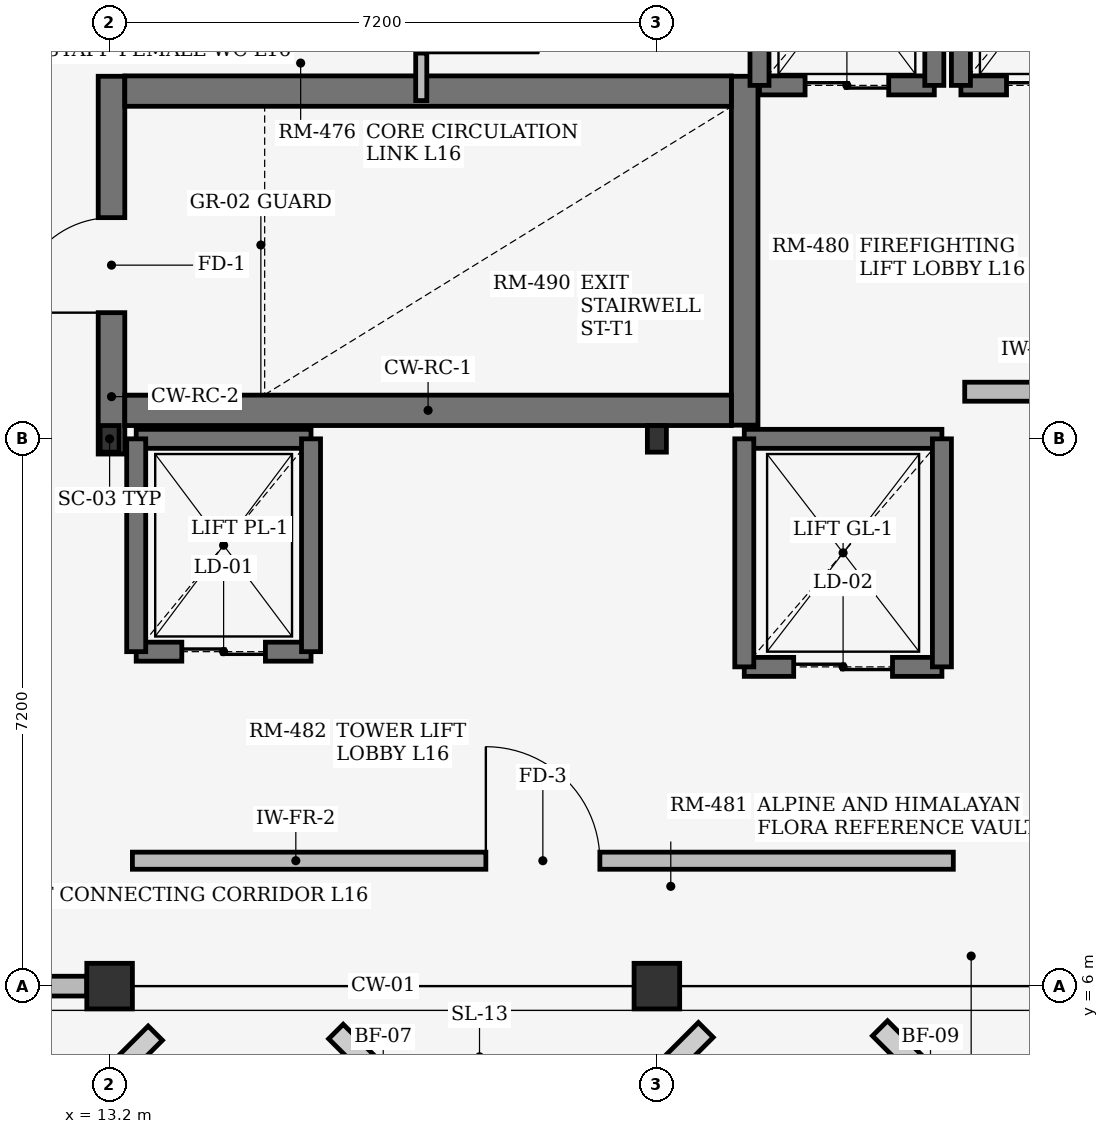
"""IFC4 building model, lengths in metres.
Left out: names, types, materials, properties, quantities, classifications, styles, units other than length and angle.
Written with IfcOpenShell. Run it as: python <this file> out.ifc"""

import sys

from ifc_helpers import new_model, si_unit, direction, frame, frame_2d, origin, origin_2d, place, context, subcontext, project, spatial, rectangle, i_section, extrude, element, fill, save


model = new_model("IFC4")
c1 = context("Model", 3, precision=1e-05, world=origin(), true_north=direction((0.0, 1.0)))
c2 = subcontext(c1, "Body", "Model", "MODEL_VIEW")
j1 = project(units=[si_unit("LENGTHUNIT", "METRE"), si_unit("PLANEANGLEUNIT", "RADIAN")], contexts=[c1])
p1 = place(None, origin())
s1 = spatial("IfcSite", under=j1, at=p1, CompositionType="ELEMENT")
p2 = place(p1, origin())
s2 = spatial("IfcBuilding", under=s1, at=p2, CompositionType="ELEMENT")
p3 = place(p2, frame((0.0, 0.0, 63.15)))
s3 = spatial("IfcBuildingStorey", under=s2, at=p3, CompositionType="ELEMENT", Elevation=63.15)
p4 = place(p3, frame((13.2, 6.0, 0.0), z_axis=(0.0, 0.0, 1.0), x_axis=(1.0, 0.0, 0.0)))
e1 = element("IfcColumn", 1, at=p4, inside=s3, PredefinedType="COLUMN", context=c2, shape_type="SweptSolid", body=[
    extrude(rectangle(XDim=0.6, YDim=0.6, at=origin_2d()), origin(), (0.0, 0.0, 1.0), 3.49),
])
p5 = place(p3, frame((13.2, 13.2, 0.0), z_axis=(0.0, 0.0, 1.0), x_axis=(1.0, 0.0, 0.0)))
e2 = element("IfcColumn", 2, at=p5, inside=s3, PredefinedType="COLUMN", context=c2, shape_type="SweptSolid", body=[
    extrude(i_section(OverallWidth=0.25, OverallDepth=0.35, WebThickness=0.01, FlangeThickness=0.012, at=origin_2d()), origin(), (0.0, 0.0, 1.0), 3.49),
])
p6 = place(p3, frame((20.4, 6.0, 0.0), z_axis=(0.0, 0.0, 1.0), x_axis=(1.0, 0.0, 0.0)))
e3 = element("IfcColumn", 3, at=p6, inside=s3, PredefinedType="COLUMN", context=c2, shape_type="SweptSolid", body=[
    extrude(rectangle(XDim=0.6, YDim=0.6, at=origin_2d()), origin(), (0.0, 0.0, 1.0), 3.49),
])
p7 = place(p3, frame((20.4, 13.2, 0.0), z_axis=(0.0, 0.0, 1.0), x_axis=(1.0, 0.0, 0.0)))
e4 = element("IfcColumn", 4, at=p7, inside=s3, PredefinedType="COLUMN", context=c2, shape_type="SweptSolid", body=[
    extrude(i_section(OverallWidth=0.25, OverallDepth=0.35, WebThickness=0.01, FlangeThickness=0.012, at=origin_2d()), origin(), (0.0, 0.0, 1.0), 3.49),
])
p8 = place(p3, frame((6.3, 6.0, 0.0), z_axis=(0.0, 0.0, 1.0), x_axis=(1.0, 0.0, 0.0)))
e5 = element("IfcWall", 5, at=p8, inside=s3, PredefinedType="STANDARD", context=c2, shape_type="SweptSolid", body=[
    extrude(rectangle(XDim=6.6, YDim=0.26, at=frame_2d((3.3, 0.0))), origin(), (0.0, 0.0, 1.0), 3.07),
])
p9 = place(p8, frame((2.6, 0.0, 0.75)))
e6 = element("IfcOpeningElement", 6, at=p9, cuts=e5, PredefinedType="OPENING", context=c2, shape_type="SweptSolid", body=[
    extrude(rectangle(XDim=1.4, YDim=1.25, at=frame_2d((0.7, 0.625))), frame((0.0, 0.14, 0.0), z_axis=(0.0, -1.0, 0.0), x_axis=(1.0, 0.0, 0.0)), (0.0, 0.0, 1.0), 0.28),
])
p10 = place(p3, frame((13.225, 13.0, 0.0), z_axis=(0.0, 0.0, 1.0), x_axis=(0.0, 1.0, 0.0)))
e7 = element("IfcWall", 7, at=p10, inside=s3, PredefinedType="SHEAR", context=c2, shape_type="SweptSolid", body=[
    extrude(rectangle(XDim=4.97, YDim=0.35, at=frame_2d((2.485, 0.0))), origin(), (0.0, 0.0, 1.0), 3.49),
])
p11 = place(p10, frame((1.86, 0.0, 0.0)))
e8 = element("IfcOpeningElement", 8, at=p11, cuts=e7, PredefinedType="OPENING", context=c2, shape_type="SweptSolid", body=[
    extrude(rectangle(XDim=1.25, YDim=2.2, at=frame_2d((0.625, 1.1))), frame((0.0, 0.185, 0.0), z_axis=(0.0, -1.0, 0.0), x_axis=(1.0, 0.0, 0.0)), (0.0, 0.0, 1.0), 0.37),
])
p12 = place(p3, frame((21.555, 13.38, 0.0), z_axis=(0.0, 0.0, 1.0), x_axis=(0.0, 1.0, 0.0)))
e9 = element("IfcWall", 9, at=p12, inside=s3, PredefinedType="SHEAR", context=c2, shape_type="SweptSolid", body=[
    extrude(rectangle(XDim=4.59, YDim=0.35, at=frame_2d((2.295, 0.0))), origin(), (0.0, 0.0, 1.0), 3.49),
])
for number, where, z_axis, x_axis in (
    (10, (13.4, 13.575, 0.0), (0.0, 0.0, 1.0), (1.0, 0.0, 0.0)),
    (11, (13.4, 17.775, 0.0), (0.0, 0.0, 1.0), (1.0, 0.0, 0.0)),
):
    element("IfcWall", number, at=place(p3, frame(where, z_axis=z_axis, x_axis=x_axis)), inside=s3, PredefinedType="SHEAR", context=c2, shape_type="SweptSolid", body=[
        extrude(rectangle(XDim=7.98, YDim=0.4, at=frame_2d((3.99, 0.0))), origin(), (0.0, 0.0, 1.0), 3.49),
    ])
p13 = place(p3, frame((21.75, 17.85, 0.0), z_axis=(0.0, 0.0, 1.0), x_axis=(1.0, 0.0, 0.0)))
e12 = element("IfcWall", 12, at=p13, inside=s3, PredefinedType="SHEAR", context=c2, shape_type="SweptSolid", body=[
    extrude(rectangle(XDim=2.3, YDim=0.25, at=frame_2d((1.15, 0.0))), origin(), (0.0, 0.0, 1.0), 3.49),
])
p14 = place(p13, frame((0.6, 0.0, 0.0)))
e13 = element("IfcOpeningElement", 13, at=p14, cuts=e12, PredefinedType="OPENING", context=c2, shape_type="SweptSolid", body=[
    extrude(rectangle(XDim=1.1, YDim=2.2, at=frame_2d((0.55, 1.1))), frame((0.0, 0.135, 0.0), z_axis=(0.0, -1.0, 0.0), x_axis=(1.0, 0.0, 0.0)), (0.0, 0.0, 1.0), 0.27),
])
for number, where, z_axis, x_axis in (
    (14, (21.75, 17.85, 0.0), (0.0, 0.0, 1.0), (0.0, 1.0, 0.0)),
    (15, (24.05, 17.85, 0.0), (0.0, 0.0, 1.0), (0.0, 1.0, 0.0)),
):
    element("IfcWall", number, at=place(p3, frame(where, z_axis=z_axis, x_axis=x_axis)), inside=s3, PredefinedType="SHEAR", context=c2, shape_type="SweptSolid", body=[
        extrude(rectangle(XDim=2.7, YDim=0.25, at=frame_2d((1.35, 0.0))), origin(), (0.0, 0.0, 1.0), 3.49),
    ])
p15 = place(p3, frame((24.4, 17.85, 0.0), z_axis=(0.0, 0.0, 1.0), x_axis=(1.0, 0.0, 0.0)))
e16 = element("IfcWall", 16, at=p15, inside=s3, PredefinedType="SHEAR", context=c2, shape_type="SweptSolid", body=[
    extrude(rectangle(XDim=2.3, YDim=0.25, at=frame_2d((1.15, 0.0))), origin(), (0.0, 0.0, 1.0), 3.49),
])
p16 = place(p15, frame((0.6, 0.0, 0.0)))
e17 = element("IfcOpeningElement", 17, at=p16, cuts=e16, PredefinedType="OPENING", context=c2, shape_type="SweptSolid", body=[
    extrude(rectangle(XDim=1.1, YDim=2.2, at=frame_2d((0.55, 1.1))), frame((0.0, 0.135, 0.0), z_axis=(0.0, -1.0, 0.0), x_axis=(1.0, 0.0, 0.0)), (0.0, 0.0, 1.0), 0.27),
])
p17 = place(p3, frame((24.4, 17.85, 0.0), z_axis=(0.0, 0.0, 1.0), x_axis=(0.0, 1.0, 0.0)))
e18 = element("IfcWall", 18, at=p17, inside=s3, PredefinedType="SHEAR", context=c2, shape_type="SweptSolid", body=[
    extrude(rectangle(XDim=2.7, YDim=0.25, at=frame_2d((1.35, 0.0))), origin(), (0.0, 0.0, 1.0), 3.49),
])
p18 = place(p3, frame((13.55, 10.4, 0.0), z_axis=(0.0, 0.0, 1.0), x_axis=(1.0, 0.0, 0.0)))
e19 = element("IfcWall", 19, at=p18, inside=s3, PredefinedType="SHEAR", context=c2, shape_type="SweptSolid", body=[
    extrude(rectangle(XDim=2.3, YDim=0.25, at=frame_2d((1.15, 0.0))), origin(), (0.0, 0.0, 1.0), 3.49),
])
p19 = place(p18, frame((0.6, 0.0, 0.0)))
e20 = element("IfcOpeningElement", 20, at=p19, cuts=e19, PredefinedType="OPENING", context=c2, shape_type="SweptSolid", body=[
    extrude(rectangle(XDim=1.1, YDim=2.2, at=frame_2d((0.55, 1.1))), frame((0.0, 0.135, 0.0), z_axis=(0.0, -1.0, 0.0), x_axis=(1.0, 0.0, 0.0)), (0.0, 0.0, 1.0), 0.27),
])
p20 = place(p3, frame((13.55, 13.2, 0.0), z_axis=(0.0, 0.0, 1.0), x_axis=(1.0, 0.0, 0.0)))
e21 = element("IfcWall", 21, at=p20, inside=s3, PredefinedType="SHEAR", context=c2, shape_type="SweptSolid", body=[
    extrude(rectangle(XDim=2.3, YDim=0.25, at=frame_2d((1.15, 0.0))), origin(), (0.0, 0.0, 1.0), 3.49),
])
for number, where, z_axis, x_axis in (
    (22, (13.55, 10.4, 0.0), (0.0, 0.0, 1.0), (0.0, 1.0, 0.0)),
    (23, (15.85, 10.4, 0.0), (0.0, 0.0, 1.0), (0.0, 1.0, 0.0)),
):
    element("IfcWall", number, at=place(p3, frame(where, z_axis=z_axis, x_axis=x_axis)), inside=s3, PredefinedType="SHEAR", context=c2, shape_type="SweptSolid", body=[
        extrude(rectangle(XDim=2.8, YDim=0.25, at=frame_2d((1.4, 0.0))), origin(), (0.0, 0.0, 1.0), 3.49),
    ])
p21 = place(p3, frame((21.55, 10.2, 0.0), z_axis=(0.0, 0.0, 1.0), x_axis=(1.0, 0.0, 0.0)))
e24 = element("IfcWall", 24, at=p21, inside=s3, PredefinedType="SHEAR", context=c2, shape_type="SweptSolid", body=[
    extrude(rectangle(XDim=2.6, YDim=0.25, at=frame_2d((1.3, 0.0))), origin(), (0.0, 0.0, 1.0), 3.49),
])
p22 = place(p21, frame((0.65, 0.0, 0.0)))
e25 = element("IfcOpeningElement", 25, at=p22, cuts=e24, PredefinedType="OPENING", context=c2, shape_type="SweptSolid", body=[
    extrude(rectangle(XDim=1.3, YDim=2.25, at=frame_2d((0.65, 1.125))), frame((0.0, 0.135, 0.0), z_axis=(0.0, -1.0, 0.0), x_axis=(1.0, 0.0, 0.0)), (0.0, 0.0, 1.0), 0.27),
])
p23 = place(p3, frame((21.55, 13.2, 0.0), z_axis=(0.0, 0.0, 1.0), x_axis=(1.0, 0.0, 0.0)))
e26 = element("IfcWall", 26, at=p23, inside=s3, PredefinedType="SHEAR", context=c2, shape_type="SweptSolid", body=[
    extrude(rectangle(XDim=2.6, YDim=0.25, at=frame_2d((1.3, 0.0))), origin(), (0.0, 0.0, 1.0), 3.49),
])
for number, where, z_axis, x_axis in (
    (27, (21.55, 10.2, 0.0), (0.0, 0.0, 1.0), (0.0, 1.0, 0.0)),
    (28, (24.15, 10.2, 0.0), (0.0, 0.0, 1.0), (0.0, 1.0, 0.0)),
):
    element("IfcWall", number, at=place(p3, frame(where, z_axis=z_axis, x_axis=x_axis)), inside=s3, PredefinedType="SHEAR", context=c2, shape_type="SweptSolid", body=[
        extrude(rectangle(XDim=3.0, YDim=0.25, at=frame_2d((1.5, 0.0))), origin(), (0.0, 0.0, 1.0), 3.49),
    ])
p24 = place(p3, frame((24.45, 13.82, 0.0), z_axis=(0.0, 0.0, 1.0), x_axis=(1.0, 0.0, 0.0)))
e29 = element("IfcWall", 29, at=p24, inside=s3, PredefinedType="SOLIDWALL", context=c2, shape_type="SweptSolid", body=[
    extrude(rectangle(XDim=2.0, YDim=0.25, at=frame_2d((1.0, 0.0))), origin(), (0.0, 0.0, 1.0), 3.47),
])
p25 = place(p3, frame((13.5, 7.65, 0.0), z_axis=(0.0, 0.0, 1.0), x_axis=(1.0, 0.0, 0.0)))
e30 = element("IfcWall", 30, at=p25, inside=s3, PredefinedType="SOLIDWALL", context=c2, shape_type="SweptSolid", body=[
    extrude(rectangle(XDim=10.8, YDim=0.225, at=frame_2d((5.4, 0.0))), origin(), (0.0, 0.0, 1.0), 3.47),
])
p26 = place(p25, frame((4.65, 0.0, 0.0)))
e31 = element("IfcOpeningElement", 31, at=p26, cuts=e30, PredefinedType="OPENING", context=c2, shape_type="SweptSolid", body=[
    extrude(rectangle(XDim=1.5, YDim=2.2, at=frame_2d((0.75, 1.1))), frame((0.0, 0.123, 0.0), z_axis=(0.0, -1.0, 0.0), x_axis=(1.0, 0.0, 0.0)), (0.0, 0.0, 1.0), 0.245),
])
p27 = place(p3, frame((17.3, 17.65, 0.0), z_axis=(0.0, 0.0, 1.0), x_axis=(0.0, 1.0, 0.0)))
e32 = element("IfcWall", 32, at=p27, inside=s3, PredefinedType="PARTITIONING", context=c2, shape_type="SweptSolid", body=[
    extrude(rectangle(XDim=2.8, YDim=0.146, at=frame_2d((1.4, 0.0))), origin(), (0.0, 0.0, 1.0), 3.47),
])
p28 = place(p27, frame((0.625, 0.0, 0.0)))
e33 = element("IfcOpeningElement", 33, at=p28, cuts=e32, PredefinedType="OPENING", context=c2, shape_type="SweptSolid", body=[
    extrude(rectangle(XDim=1.55, YDim=2.25, at=frame_2d((0.775, 1.125))), frame((0.0, 0.083, 0.0), z_axis=(0.0, -1.0, 0.0), x_axis=(1.0, 0.0, 0.0)), (0.0, 0.0, 1.0), 0.166),
])
p29 = place(p11, origin())
e34 = element("IfcDoor", 34, at=p29, inside=s3, OperationType="SINGLE_SWING_LEFT", PredefinedType="DOOR", context=c2, shape_type="SweptSolid", body=[
    extrude(rectangle(XDim=1.25, YDim=2.2, at=frame_2d((0.625, 1.1))), frame((0.0, 0.025, 0.0), z_axis=(0.0, -1.0, 0.0), x_axis=(1.0, 0.0, 0.0)), (0.0, 0.0, 1.0), 0.05),
])
fill(e8, e34)
p30 = place(p14, origin())
e35 = element("IfcDoor", 35, at=p30, inside=s3, OperationType="DOUBLE_DOOR_SLIDING", PredefinedType="DOOR", context=c2, shape_type="SweptSolid", body=[
    extrude(rectangle(XDim=1.1, YDim=2.2, at=frame_2d((0.55, 1.1))), frame((0.0, 0.025, 0.0), z_axis=(0.0, -1.0, 0.0), x_axis=(1.0, 0.0, 0.0)), (0.0, 0.0, 1.0), 0.05),
])
fill(e13, e35)
p31 = place(p16, origin())
e36 = element("IfcDoor", 36, at=p31, inside=s3, OperationType="DOUBLE_DOOR_SLIDING", PredefinedType="DOOR", context=c2, shape_type="SweptSolid", body=[
    extrude(rectangle(XDim=1.1, YDim=2.2, at=frame_2d((0.55, 1.1))), frame((0.0, 0.025, 0.0), z_axis=(0.0, -1.0, 0.0), x_axis=(1.0, 0.0, 0.0)), (0.0, 0.0, 1.0), 0.05),
])
fill(e17, e36)
p32 = place(p19, origin())
e37 = element("IfcDoor", 37, at=p32, inside=s3, OperationType="DOUBLE_DOOR_SLIDING", PredefinedType="DOOR", context=c2, shape_type="SweptSolid", body=[
    extrude(rectangle(XDim=1.1, YDim=2.2, at=frame_2d((0.55, 1.1))), frame((0.0, 0.025, 0.0), z_axis=(0.0, -1.0, 0.0), x_axis=(1.0, 0.0, 0.0)), (0.0, 0.0, 1.0), 0.05),
])
fill(e20, e37)
p33 = place(p22, origin())
e38 = element("IfcDoor", 38, at=p33, inside=s3, OperationType="DOUBLE_DOOR_SLIDING", PredefinedType="DOOR", context=c2, shape_type="SweptSolid", body=[
    extrude(rectangle(XDim=1.3, YDim=2.25, at=frame_2d((0.65, 1.125))), frame((0.0, 0.025, 0.0), z_axis=(0.0, -1.0, 0.0), x_axis=(1.0, 0.0, 0.0)), (0.0, 0.0, 1.0), 0.05),
])
fill(e25, e38)
p34 = place(p26, origin())
e39 = element("IfcDoor", 39, at=p34, inside=s3, OperationType="SINGLE_SWING_LEFT", PredefinedType="DOOR", context=c2, shape_type="SweptSolid", body=[
    extrude(rectangle(XDim=1.5, YDim=2.2, at=frame_2d((0.75, 1.1))), frame((0.0, 0.025, 0.0), z_axis=(0.0, -1.0, 0.0), x_axis=(1.0, 0.0, 0.0)), (0.0, 0.0, 1.0), 0.05),
])
fill(e31, e39)
p35 = place(p28, frame((1.55, 0.0, 0.0), z_axis=(0.0, 0.0, 1.0), x_axis=(-1.0, 0.0, 0.0)))
e40 = element("IfcDoor", 40, at=p35, inside=s3, OperationType="DOUBLE_DOOR_SINGLE_SWING", PredefinedType="DOOR", context=c2, shape_type="SweptSolid", body=[
    extrude(rectangle(XDim=1.55, YDim=2.25, at=frame_2d((0.775, 1.125))), frame((0.0, 0.025, 0.0), z_axis=(0.0, -1.0, 0.0), x_axis=(1.0, 0.0, 0.0)), (0.0, 0.0, 1.0), 0.05),
])
fill(e33, e40)
save(model, sys.argv[1])
